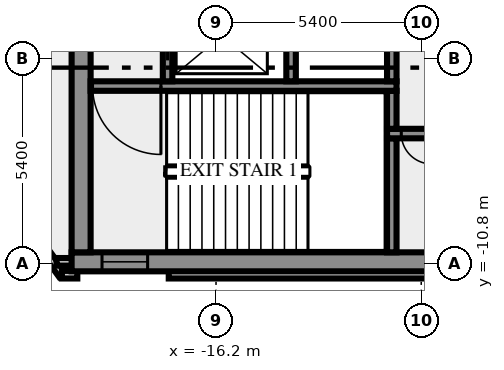
"""IFC4 building model, lengths in metres.
Left out: names, types, materials, properties, quantities, classifications, styles, units other than length and angle.
Written with IfcOpenShell. Run it as: python <this file> out.ifc"""

import sys

from ifc_helpers import new_model, si_unit, direction, frame, frame_2d, origin, place, context, subcontext, project, spatial, rectangle, extrude, element, fill, save


model = new_model("IFC4")
c1 = context("Model", 3, precision=1e-05, world=origin(), true_north=direction((0.0, 1.0)))
c2 = subcontext(c1, "Body", "Model", "MODEL_VIEW")
j1 = project(units=[si_unit("LENGTHUNIT", "METRE"), si_unit("PLANEANGLEUNIT", "RADIAN")], contexts=[c1])
p1 = place(None, origin())
s1 = spatial("IfcSite", under=j1, at=p1, CompositionType="ELEMENT")
p2 = place(p1, origin())
s2 = spatial("IfcBuilding", under=s1, at=p2, CompositionType="ELEMENT")
p3 = place(p2, frame((0.0, 0.0, 269.0)))
s3 = spatial("IfcBuildingStorey", under=s2, at=p3, CompositionType="ELEMENT", Elevation=269.0)
p4 = place(p3, frame((-21.833, -8.909, 0.0), z_axis=(0.0, 0.0, 1.0), x_axis=(0.587766567315, -0.809030569476, 0.0)))
e1 = element("IfcWall", 1, at=p4, inside=s3, PredefinedType="SOLIDWALL", context=c2, shape_type="SweptSolid", body=[
    extrude(rectangle(XDim=2.688, YDim=0.2, at=frame_2d((1.344, 0.0))), origin(), (0.0, 0.0, 1.0), 3.5),
])
p5 = place(p3, frame((-20.256, -11.088, 0.0), z_axis=(0.0, 0.0, 1.0), x_axis=(1.0, 0.0, 0.0)))
e2 = element("IfcWall", 2, at=p5, inside=s3, PredefinedType="SOLIDWALL", context=c2, shape_type="SweptSolid", body=[
    extrude(rectangle(XDim=0.406, YDim=0.2, at=frame_2d((0.203, 0.0))), origin(), (0.0, 0.0, 1.0), 3.5),
])
p6 = place(p3, frame((-17.444, -11.088, 0.0), z_axis=(0.0, 0.0, 1.0), x_axis=(1.0, 0.0, 0.0)))
e3 = element("IfcWall", 3, at=p6, inside=s3, PredefinedType="SOLIDWALL", context=c2, shape_type="SweptSolid", body=[
    extrude(rectangle(XDim=34.888, YDim=0.2, at=frame_2d((17.444, 0.0))), origin(), (0.0, 0.0, 1.0), 3.5),
])
p7 = place(p3, frame((-19.98, -10.75, 0.0), z_axis=(0.0, 0.0, 1.0), x_axis=(-1.0, 0.0, 0.0)))
e4 = element("IfcWall", 4, at=p7, inside=s3, PredefinedType="SOLIDWALL", context=c2, shape_type="SweptSolid", body=[
    extrude(rectangle(XDim=0.417, YDim=0.2, at=frame_2d((0.208, 0.0))), origin(), (0.0, 0.0, 1.0), 3.5),
])
p8 = place(p3, frame((-20.0, -10.75, 0.0), z_axis=(0.0, 0.0, 1.0), x_axis=(1.0, 0.0, 0.0)))
e5 = element("IfcWall", 5, at=p8, inside=s3, PredefinedType="SHEAR", context=c2, shape_type="SweptSolid", body=[
    extrude(rectangle(XDim=40.0, YDim=0.5, at=frame_2d((20.0, 0.0))), origin(), (0.0, 0.0, 1.0), 3.5),
])
p9 = place(p8, frame((0.8, 0.0, 1.0)))
e6 = element("IfcOpeningElement", 6, at=p9, cuts=e5, PredefinedType="OPENING", context=c2, shape_type="SweptSolid", body=[
    extrude(rectangle(XDim=1.2, YDim=1.2, at=frame_2d((0.6, 0.6))), frame((0.0, 0.26, 0.0), z_axis=(0.0, -1.0, 0.0), x_axis=(1.0, 0.0, 0.0)), (0.0, 0.0, 1.0), 0.52),
])
p10 = place(p8, frame((38.0, 0.0, 1.0)))
e7 = element("IfcOpeningElement", 7, at=p10, cuts=e5, PredefinedType="OPENING", context=c2, shape_type="SweptSolid", body=[
    extrude(rectangle(XDim=1.2, YDim=1.2, at=frame_2d((0.6, 0.6))), frame((0.0, 0.26, 0.0), z_axis=(0.0, -1.0, 0.0), x_axis=(1.0, 0.0, 0.0)), (0.0, 0.0, 1.0), 0.52),
])
p11 = place(p3, frame((-19.75, -10.5, 0.0), z_axis=(0.0, 0.0, 1.0), x_axis=(0.0, 1.0, 0.0)))
e8 = element("IfcWall", 8, at=p11, inside=s3, PredefinedType="SHEAR", context=c2, shape_type="SweptSolid", body=[
    extrude(rectangle(XDim=8.8, YDim=0.5, at=frame_2d((4.4, 0.0))), origin(), (0.0, 0.0, 1.0), 3.5),
])
p12 = place(p3, frame((-11.575, -10.5, 0.0), z_axis=(0.0, 0.0, 1.0), x_axis=(0.0, 1.0, 0.0)))
e9 = element("IfcWall", 9, at=p12, inside=s3, PredefinedType="SHEAR", context=c2, shape_type="SweptSolid", body=[
    extrude(rectangle(XDim=3.0, YDim=0.25, at=frame_2d((1.5, 0.0))), origin(), (0.0, 0.0, 1.0), 3.5),
])
p13 = place(p3, frame((11.7, -7.375, 0.0), z_axis=(0.0, 0.0, 1.0), x_axis=(-1.0, 0.0, 0.0)))
e10 = element("IfcWall", 10, at=p13, inside=s3, PredefinedType="SHEAR", context=c2, shape_type="SweptSolid", body=[
    extrude(rectangle(XDim=23.4, YDim=0.25, at=frame_2d((11.7, 0.0))), origin(), (0.0, 0.0, 1.0), 3.5),
])
p14 = place(p13, frame((22.225, 0.0, 0.0)))
e11 = element("IfcOpeningElement", 11, at=p14, cuts=e10, PredefinedType="OPENING", context=c2, shape_type="SweptSolid", body=[
    extrude(rectangle(XDim=0.8, YDim=2.1, at=frame_2d((0.4, 1.05))), frame((0.0, 0.135, 0.0), z_axis=(0.0, -1.0, 0.0), x_axis=(1.0, 0.0, 0.0)), (0.0, 0.0, 1.0), 0.27),
])
p15 = place(p13, frame((20.2, 0.0, 0.0)))
e12 = element("IfcOpeningElement", 12, at=p15, cuts=e10, PredefinedType="OPENING", context=c2, shape_type="SweptSolid", body=[
    extrude(rectangle(XDim=1.1, YDim=2.1, at=frame_2d((0.55, 1.05))), frame((0.0, 0.135, 0.0), z_axis=(0.0, -1.0, 0.0), x_axis=(1.0, 0.0, 0.0)), (0.0, 0.0, 1.0), 0.27),
])
p16 = place(p13, frame((17.7, 0.0, 0.0)))
e13 = element("IfcOpeningElement", 13, at=p16, cuts=e10, PredefinedType="OPENING", context=c2, shape_type="SweptSolid", body=[
    extrude(rectangle(XDim=1.1, YDim=2.1, at=frame_2d((0.55, 1.05))), frame((0.0, 0.135, 0.0), z_axis=(0.0, -1.0, 0.0), x_axis=(1.0, 0.0, 0.0)), (0.0, 0.0, 1.0), 0.27),
])
p17 = place(p13, frame((15.975, 0.0, 0.0)))
e14 = element("IfcOpeningElement", 14, at=p17, cuts=e10, PredefinedType="OPENING", context=c2, shape_type="SweptSolid", body=[
    extrude(rectangle(XDim=0.8, YDim=2.1, at=frame_2d((0.4, 1.05))), frame((0.0, 0.135, 0.0), z_axis=(0.0, -1.0, 0.0), x_axis=(1.0, 0.0, 0.0)), (0.0, 0.0, 1.0), 0.27),
])
p18 = place(p13, frame((14.75, 0.0, 0.0)))
e15 = element("IfcOpeningElement", 15, at=p18, cuts=e10, PredefinedType="OPENING", context=c2, shape_type="SweptSolid", body=[
    extrude(rectangle(XDim=0.7, YDim=2.1, at=frame_2d((0.35, 1.05))), frame((0.0, 0.135, 0.0), z_axis=(0.0, -1.0, 0.0), x_axis=(1.0, 0.0, 0.0)), (0.0, 0.0, 1.0), 0.27),
])
p19 = place(p13, frame((13.35, 0.0, 0.0)))
e16 = element("IfcOpeningElement", 16, at=p19, cuts=e10, PredefinedType="OPENING", context=c2, shape_type="SweptSolid", body=[
    extrude(rectangle(XDim=0.9, YDim=2.1, at=frame_2d((0.45, 1.05))), frame((0.0, 0.135, 0.0), z_axis=(0.0, -1.0, 0.0), x_axis=(1.0, 0.0, 0.0)), (0.0, 0.0, 1.0), 0.27),
])
p20 = place(p13, frame((11.975, 0.0, 0.0)))
e17 = element("IfcOpeningElement", 17, at=p20, cuts=e10, PredefinedType="OPENING", context=c2, shape_type="SweptSolid", body=[
    extrude(rectangle(XDim=0.9, YDim=2.1, at=frame_2d((0.45, 1.05))), frame((0.0, 0.135, 0.0), z_axis=(0.0, -1.0, 0.0), x_axis=(1.0, 0.0, 0.0)), (0.0, 0.0, 1.0), 0.27),
])
p21 = place(p13, frame((10.5, 0.0, 0.0)))
e18 = element("IfcOpeningElement", 18, at=p21, cuts=e10, PredefinedType="OPENING", context=c2, shape_type="SweptSolid", body=[
    extrude(rectangle(XDim=0.9, YDim=2.1, at=frame_2d((0.45, 1.05))), frame((0.0, 0.135, 0.0), z_axis=(0.0, -1.0, 0.0), x_axis=(1.0, 0.0, 0.0)), (0.0, 0.0, 1.0), 0.27),
])
p22 = place(p13, frame((8.663, 0.0, 0.0)))
e19 = element("IfcOpeningElement", 19, at=p22, cuts=e10, PredefinedType="OPENING", context=c2, shape_type="SweptSolid", body=[
    extrude(rectangle(XDim=0.9, YDim=2.1, at=frame_2d((0.45, 1.05))), frame((0.0, 0.135, 0.0), z_axis=(0.0, -1.0, 0.0), x_axis=(1.0, 0.0, 0.0)), (0.0, 0.0, 1.0), 0.27),
])
p23 = place(p13, frame((6.05, 0.0, 0.0)))
e20 = element("IfcOpeningElement", 20, at=p23, cuts=e10, PredefinedType="OPENING", context=c2, shape_type="SweptSolid", body=[
    extrude(rectangle(XDim=0.9, YDim=2.1, at=frame_2d((0.45, 1.05))), frame((0.0, 0.135, 0.0), z_axis=(0.0, -1.0, 0.0), x_axis=(1.0, 0.0, 0.0)), (0.0, 0.0, 1.0), 0.27),
])
p24 = place(p13, frame((2.088, 0.0, 0.0)))
e21 = element("IfcOpeningElement", 21, at=p24, cuts=e10, PredefinedType="OPENING", context=c2, shape_type="SweptSolid", body=[
    extrude(rectangle(XDim=0.9, YDim=2.1, at=frame_2d((0.45, 1.05))), frame((0.0, 0.135, 0.0), z_axis=(0.0, -1.0, 0.0), x_axis=(1.0, 0.0, 0.0)), (0.0, 0.0, 1.0), 0.27),
])
p25 = place(p3, frame((-11.575, -7.25, 0.0), z_axis=(0.0, 0.0, 1.0), x_axis=(0.0, 1.0, 0.0)))
e22 = element("IfcWall", 22, at=p25, inside=s3, PredefinedType="SHEAR", context=c2, shape_type="SweptSolid", body=[
    extrude(rectangle(XDim=1.0, YDim=0.25, at=frame_2d((0.5, 0.0))), origin(), (0.0, 0.0, 1.0), 3.5),
])
p26 = place(p3, frame((-11.45, -6.125, 0.0), z_axis=(0.0, 0.0, 1.0), x_axis=(-1.0, 0.0, 0.0)))
e23 = element("IfcWall", 23, at=p26, inside=s3, PredefinedType="SHEAR", context=c2, shape_type="SweptSolid", body=[
    extrude(rectangle(XDim=8.05, YDim=0.25, at=frame_2d((4.025, 0.0))), origin(), (0.0, 0.0, 1.0), 3.5),
])
p27 = place(p26, frame((6.2, 0.0, 0.0)))
e24 = element("IfcOpeningElement", 24, at=p27, cuts=e23, PredefinedType="OPENING", context=c2, shape_type="SweptSolid", body=[
    extrude(rectangle(XDim=1.8, YDim=2.1, at=frame_2d((0.9, 1.05))), frame((0.0, 0.135, 0.0), z_axis=(0.0, -1.0, 0.0), x_axis=(1.0, 0.0, 0.0)), (0.0, 0.0, 1.0), 0.27),
])
p28 = place(p3, frame((-17.475, -6.0, 0.0), z_axis=(0.0, 0.0, 1.0), x_axis=(0.0, 1.0, 0.0)))
e25 = element("IfcWall", 25, at=p28, inside=s3, PredefinedType="SHEAR", context=c2, shape_type="SweptSolid", body=[
    extrude(rectangle(XDim=4.3, YDim=0.25, at=frame_2d((2.15, 0.0))), origin(), (0.0, 0.0, 1.0), 3.5),
])
p29 = place(p28, frame((0.55, 0.0, 0.0)))
e26 = element("IfcOpeningElement", 26, at=p29, cuts=e25, PredefinedType="OPENING", context=c2, shape_type="SweptSolid", body=[
    extrude(rectangle(XDim=1.3, YDim=2.1, at=frame_2d((0.65, 1.05))), frame((0.0, 0.135, 0.0), z_axis=(0.0, -1.0, 0.0), x_axis=(1.0, 0.0, 0.0)), (0.0, 0.0, 1.0), 0.27),
])
for number, where, z_axis, x_axis in (
    (27, (-14.225, -6.0, 0.0), (0.0, 0.0, 1.0), (0.0, 1.0, 0.0)),
    (28, (-11.575, -6.0, 0.0), (0.0, 0.0, 1.0), (0.0, 1.0, 0.0)),
):
    element("IfcWall", number, at=place(p3, frame(where, z_axis=z_axis, x_axis=x_axis)), inside=s3, PredefinedType="SHEAR", context=c2, shape_type="SweptSolid", body=[
        extrude(rectangle(XDim=1.75, YDim=0.25, at=frame_2d((0.875, 0.0))), origin(), (0.0, 0.0, 1.0), 3.5),
    ])
p30 = place(p9, origin())
e29 = element("IfcWindow", 29, at=p30, inside=s3, PartitioningType="SINGLE_PANEL", PredefinedType="WINDOW", context=c2, shape_type="SweptSolid", body=[
    extrude(rectangle(XDim=1.2, YDim=1.2, at=frame_2d((0.6, 0.6))), frame((0.0, 0.03, 0.0), z_axis=(0.0, -1.0, 0.0), x_axis=(1.0, 0.0, 0.0)), (0.0, 0.0, 1.0), 0.06),
])
fill(e6, e29)
p31 = place(p14, origin())
e30 = element("IfcDoor", 30, at=p31, inside=s3, OperationType="SINGLE_SWING_RIGHT", PredefinedType="DOOR", context=c2, shape_type="SweptSolid", body=[
    extrude(rectangle(XDim=0.8, YDim=2.1, at=frame_2d((0.4, 1.05))), frame((0.0, 0.025, 0.0), z_axis=(0.0, -1.0, 0.0), x_axis=(1.0, 0.0, 0.0)), (0.0, 0.0, 1.0), 0.05),
])
fill(e11, e30)
p32 = place(p27, origin())
e31 = element("IfcDoor", 31, at=p32, inside=s3, OperationType="DOUBLE_DOOR_SINGLE_SWING", PredefinedType="DOOR", context=c2, shape_type="SweptSolid", body=[
    extrude(rectangle(XDim=1.8, YDim=2.1, at=frame_2d((0.9, 1.05))), frame((0.0, 0.025, 0.0), z_axis=(0.0, -1.0, 0.0), x_axis=(1.0, 0.0, 0.0)), (0.0, 0.0, 1.0), 0.05),
])
fill(e24, e31)
p33 = place(p29, origin())
e32 = element("IfcDoor", 32, at=p33, inside=s3, OperationType="DOUBLE_DOOR_SLIDING", PredefinedType="DOOR", context=c2, shape_type="SweptSolid", body=[
    extrude(rectangle(XDim=1.3, YDim=2.1, at=frame_2d((0.65, 1.05))), frame((0.0, 0.025, 0.0), z_axis=(0.0, -1.0, 0.0), x_axis=(1.0, 0.0, 0.0)), (0.0, 0.0, 1.0), 0.05),
])
fill(e26, e32)
save(model, sys.argv[1])
